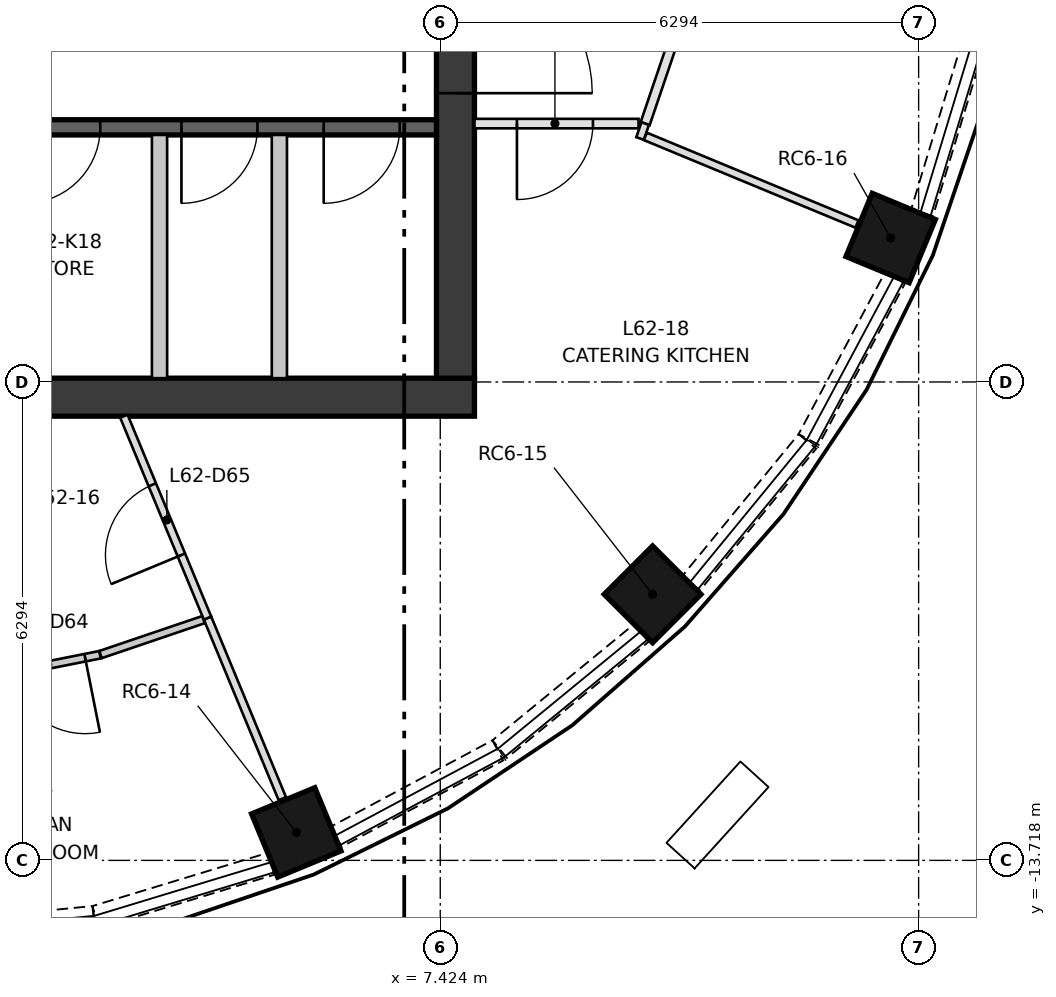
"""IFC4 building model, lengths in metres.
Left out: names, types, materials, properties, quantities, classifications, styles, units other than length and angle.
Written with IfcOpenShell. Run it as: python <this file> out.ifc"""

import sys

from ifc_helpers import new_model, si_unit, direction, frame, frame_2d, origin, origin_2d, place, context, subcontext, project, spatial, rectangle, extrude, element, fill, save


model = new_model("IFC4")
c1 = context("Model", 3, precision=1e-05, world=origin(), true_north=direction((0.0, 1.0)))
c2 = subcontext(c1, "Body", "Model", "MODEL_VIEW")
j1 = project(units=[si_unit("LENGTHUNIT", "METRE"), si_unit("PLANEANGLEUNIT", "RADIAN")], contexts=[c1])
p1 = place(None, origin())
s1 = spatial("IfcSite", under=j1, at=p1, CompositionType="ELEMENT")
p2 = place(p1, origin())
s2 = spatial("IfcBuilding", under=s1, at=p2, CompositionType="ELEMENT")
p3 = place(p2, frame((0.0, 0.0, 227.85)))
s3 = spatial("IfcBuildingStorey", under=s2, at=p3, CompositionType="ELEMENT", Elevation=227.85)
for number, where, z_axis, x_axis in (
    (1, (5.53, -13.35, 0.5), (0.0, 0.0, 1.0), (0.383, -0.924, 0.0)),
    (2, (10.218, -10.218, 0.5), (0.0, 0.0, 1.0), (0.707, -0.707, 0.0)),
    (3, (13.35, -5.53, 0.5), (0.0, 0.0, 1.0), (0.924, -0.383, 0.0)),
):
    element("IfcColumn", number, at=place(p3, frame(where, z_axis=z_axis, x_axis=x_axis)), inside=s3, PredefinedType="COLUMN", context=c2, shape_type="SweptSolid", body=[
        extrude(rectangle(XDim=0.9, YDim=0.9, at=origin_2d()), origin(), (0.0, 0.0, 1.0), 2.35),
    ])
p4 = place(p3, frame((-7.874, -7.624, 0.0), z_axis=(0.0, 0.0, 1.0), x_axis=(1.0, 0.0, 0.0)))
e4 = element("IfcWall", 4, at=p4, inside=s3, PredefinedType="SHEAR", context=c2, shape_type="SweptSolid", body=[
    extrude(rectangle(XDim=15.748, YDim=0.5, at=frame_2d((7.874, 0.0))), origin(), (0.0, 0.0, 1.0), 3.35),
])
p5 = place(p3, frame((7.624, -7.374, 0.0), z_axis=(0.0, 0.0, 1.0), x_axis=(0.0, 1.0, 0.0)))
e5 = element("IfcWall", 5, at=p5, inside=s3, PredefinedType="SHEAR", context=c2, shape_type="SweptSolid", body=[
    extrude(rectangle(XDim=14.748, YDim=0.5, at=frame_2d((7.374, 0.0))), origin(), (0.0, 0.0, 1.0), 3.35),
])
p6 = place(p5, frame((6.874, 0.0, 0.0)))
e6 = element("IfcOpeningElement", 6, at=p6, cuts=e5, PredefinedType="OPENING", context=c2, shape_type="SweptSolid", body=[
    extrude(rectangle(XDim=1.0, YDim=2.1, at=frame_2d((0.5, 1.05))), frame((0.0, 0.26, 0.0), z_axis=(0.0, -1.0, 0.0), x_axis=(1.0, 0.0, 0.0)), (0.0, 0.0, 1.0), 0.52),
])
p7 = place(p5, frame((3.75, 0.0, 0.0)))
e7 = element("IfcOpeningElement", 7, at=p7, cuts=e5, PredefinedType="OPENING", context=c2, shape_type="SweptSolid", body=[
    extrude(rectangle(XDim=1.8, YDim=2.1, at=frame_2d((0.9, 1.05))), frame((0.0, 0.26, 0.0), z_axis=(0.0, -1.0, 0.0), x_axis=(1.0, 0.0, 0.0)), (0.0, 0.0, 1.0), 0.52),
])
p8 = place(p5, frame((9.198, 0.0, 0.0)))
e8 = element("IfcOpeningElement", 8, at=p8, cuts=e5, PredefinedType="OPENING", context=c2, shape_type="SweptSolid", body=[
    extrude(rectangle(XDim=1.8, YDim=2.1, at=frame_2d((0.9, 1.05))), frame((0.0, 0.26, 0.0), z_axis=(0.0, -1.0, 0.0), x_axis=(1.0, 0.0, 0.0)), (0.0, 0.0, 1.0), 0.52),
])
p9 = place(p3, frame((-7.374, -4.074, 0.0), z_axis=(0.0, 0.0, 1.0), x_axis=(1.0, 0.0, 0.0)))
e9 = element("IfcWall", 9, at=p9, inside=s3, PredefinedType="SHEAR", context=c2, shape_type="SweptSolid", body=[
    extrude(rectangle(XDim=14.748, YDim=0.2, at=frame_2d((7.374, 0.0))), origin(), (0.0, 0.0, 1.0), 3.0),
])
p10 = place(p9, frame((1.319, 0.0, 0.0)))
e10 = element("IfcOpeningElement", 10, at=p10, cuts=e9, PredefinedType="OPENING", context=c2, shape_type="SweptSolid", body=[
    extrude(rectangle(XDim=1.1, YDim=2.1, at=frame_2d((0.55, 1.05))), frame((0.0, 0.11, 0.0), z_axis=(0.0, -1.0, 0.0), x_axis=(1.0, 0.0, 0.0)), (0.0, 0.0, 1.0), 0.22),
])
p11 = place(p9, frame((4.456, 0.0, 0.0)))
e11 = element("IfcOpeningElement", 11, at=p11, cuts=e9, PredefinedType="OPENING", context=c2, shape_type="SweptSolid", body=[
    extrude(rectangle(XDim=1.1, YDim=2.1, at=frame_2d((0.55, 1.05))), frame((0.0, 0.11, 0.0), z_axis=(0.0, -1.0, 0.0), x_axis=(1.0, 0.0, 0.0)), (0.0, 0.0, 1.0), 0.22),
])
p12 = place(p9, frame((7.159, 0.0, 0.0)))
e12 = element("IfcOpeningElement", 12, at=p12, cuts=e9, PredefinedType="OPENING", context=c2, shape_type="SweptSolid", body=[
    extrude(rectangle(XDim=0.8, YDim=2.1, at=frame_2d((0.4, 1.05))), frame((0.0, 0.11, 0.0), z_axis=(0.0, -1.0, 0.0), x_axis=(1.0, 0.0, 0.0)), (0.0, 0.0, 1.0), 0.22),
])
p13 = place(p9, frame((9.324, 0.0, 0.0)))
e13 = element("IfcOpeningElement", 13, at=p13, cuts=e9, PredefinedType="OPENING", context=c2, shape_type="SweptSolid", body=[
    extrude(rectangle(XDim=1.0, YDim=2.1, at=frame_2d((0.5, 1.05))), frame((0.0, 0.11, 0.0), z_axis=(0.0, -1.0, 0.0), x_axis=(1.0, 0.0, 0.0)), (0.0, 0.0, 1.0), 0.22),
])
p14 = place(p9, frame((11.393, 0.0, 0.0)))
e14 = element("IfcOpeningElement", 14, at=p14, cuts=e9, PredefinedType="OPENING", context=c2, shape_type="SweptSolid", body=[
    extrude(rectangle(XDim=1.0, YDim=2.1, at=frame_2d((0.5, 1.05))), frame((0.0, 0.11, 0.0), z_axis=(0.0, -1.0, 0.0), x_axis=(1.0, 0.0, 0.0)), (0.0, 0.0, 1.0), 0.22),
])
p15 = place(p9, frame((13.265, 0.0, 0.0)))
e15 = element("IfcOpeningElement", 15, at=p15, cuts=e9, PredefinedType="OPENING", context=c2, shape_type="SweptSolid", body=[
    extrude(rectangle(XDim=1.0, YDim=2.1, at=frame_2d((0.5, 1.05))), frame((0.0, 0.11, 0.0), z_axis=(0.0, -1.0, 0.0), x_axis=(1.0, 0.0, 0.0)), (0.0, 0.0, 1.0), 0.22),
])
for number, where, z_axis, x_axis in (
    (16, (3.73, -7.374, 0.0), (0.0, 0.0, 1.0), (0.0, 1.0, 0.0)),
    (17, (5.307, -7.374, 0.0), (0.0, 0.0, 1.0), (0.0, 1.0, 0.0)),
):
    element("IfcWall", number, at=place(p3, frame(where, z_axis=z_axis, x_axis=x_axis)), inside=s3, PredefinedType="PARTITIONING", context=c2, shape_type="SweptSolid", body=[
        extrude(rectangle(XDim=3.2, YDim=0.2, at=frame_2d((1.6, 0.0))), origin(), (0.0, 0.0, 1.0), 3.0),
    ])
p16 = place(p3, frame((0.463, -14.705, 0.0), z_axis=(0.0, 0.0, 1.0), x_axis=(0.99519336672, 0.09792937678, 0.0)))
e18 = element("IfcWall", 18, at=p16, inside=s3, PredefinedType="SOLIDWALL", context=c2, shape_type="SweptSolid", body=[
    extrude(rectangle(XDim=2.411, YDim=0.3, at=frame_2d((1.205, 0.0))), origin(), (0.0, 0.0, 1.0), 0.9),
])
p17 = place(p3, frame((2.891, -14.463, 0.0), z_axis=(0.0, 0.0, 1.0), x_axis=(0.956901683383, 0.290412066449, 0.0)))
e19 = element("IfcWall", 19, at=p17, inside=s3, PredefinedType="SOLIDWALL", context=c2, shape_type="SweptSolid", body=[
    extrude(rectangle(XDim=2.411, YDim=0.3, at=frame_2d((1.206, 0.0))), origin(), (0.0, 0.0, 1.0), 0.9),
])
p18 = place(p3, frame((6.055, -13.407, 0.0), z_axis=(0.0, 0.0, 1.0), x_axis=(0.881962886229, 0.471318859495, 0.0)))
e20 = element("IfcWall", 20, at=p18, inside=s3, PredefinedType="SOLIDWALL", context=c2, shape_type="SweptSolid", body=[
    extrude(rectangle(XDim=2.41, YDim=0.3, at=frame_2d((1.205, 0.0))), origin(), (0.0, 0.0, 1.0), 0.9),
])
for number, where, z_axis, x_axis in (
    (21, (8.206, -12.254, 0.0), (0.0, 0.0, 1.0), (0.773, 0.634, 0.0)),
    (22, (10.726, -10.07, 0.0), (0.0, 0.0, 1.0), (0.634, 0.773, 0.0)),
):
    element("IfcWall", number, at=place(p3, frame(where, z_axis=z_axis, x_axis=x_axis)), inside=s3, PredefinedType="SOLIDWALL", context=c2, shape_type="SweptSolid", body=[
        extrude(rectangle(XDim=2.411, YDim=0.3, at=frame_2d((1.206, 0.0))), origin(), (0.0, 0.0, 1.0), 0.9),
    ])
p19 = place(p3, frame((12.271, -8.181, 0.0), z_axis=(0.0, 0.0, 1.0), x_axis=(0.471318859495, 0.881962886229, 0.0)))
e23 = element("IfcWall", 23, at=p19, inside=s3, PredefinedType="SOLIDWALL", context=c2, shape_type="SweptSolid", body=[
    extrude(rectangle(XDim=2.41, YDim=0.3, at=frame_2d((1.205, 0.0))), origin(), (0.0, 0.0, 1.0), 0.9),
])
p20 = place(p3, frame((13.762, -5.198, 0.0), z_axis=(0.0, 0.0, 1.0), x_axis=(0.290412066449, 0.956901683383, 0.0)))
e24 = element("IfcWall", 24, at=p20, inside=s3, PredefinedType="SOLIDWALL", context=c2, shape_type="SweptSolid", body=[
    extrude(rectangle(XDim=2.411, YDim=0.3, at=frame_2d((1.206, 0.0))), origin(), (0.0, 0.0, 1.0), 0.9),
])
p21 = place(p3, frame((10.527, -2.825, 0.0), z_axis=(0.0, 0.0, 1.0), x_axis=(-0.321484610675, -0.946914803506, 0.0)))
e25 = element("IfcWall", 25, at=p21, inside=s3, PredefinedType="PARTITIONING", context=c2, shape_type="SweptSolid", body=[
    extrude(rectangle(XDim=1.267, YDim=0.125, at=frame_2d((0.633, 0.0))), origin(), (0.0, 0.0, 1.0), 3.0),
])
p22 = place(p3, frame((10.033, -4.024, 0.0), z_axis=(0.0, 0.0, 1.0), x_axis=(-1.0, 0.0, 0.0)))
e26 = element("IfcWall", 26, at=p22, inside=s3, PredefinedType="PARTITIONING", context=c2, shape_type="SweptSolid", body=[
    extrude(rectangle(XDim=2.159, YDim=0.125, at=frame_2d((1.08, 0.0))), origin(), (0.0, 0.0, 1.0), 3.0),
])
p23 = place(p22, frame((0.6, 0.0, 0.0)))
e27 = element("IfcOpeningElement", 27, at=p23, cuts=e26, PredefinedType="OPENING", context=c2, shape_type="SweptSolid", body=[
    extrude(rectangle(XDim=1.0, YDim=2.1, at=frame_2d((0.5, 1.05))), frame((0.0, 0.073, 0.0), z_axis=(0.0, -1.0, 0.0), x_axis=(1.0, 0.0, 0.0)), (0.0, 0.0, 1.0), 0.145),
])
p24 = place(p3, frame((10.053, -4.221, 0.0), z_axis=(0.0, 0.0, 1.0), x_axis=(0.321164468818, 0.947023433696, 0.0)))
e28 = element("IfcWall", 28, at=p24, inside=s3, PredefinedType="PARTITIONING", context=c2, shape_type="SweptSolid", body=[
    extrude(rectangle(XDim=0.208, YDim=0.105, at=frame_2d((0.104, 0.0))), origin(), (0.0, 0.0, 1.0), 3.0),
])
p25 = place(p3, frame((12.906, -5.346, 0.0), z_axis=(0.0, 0.0, 1.0), x_axis=(-0.923853917674, 0.3827452662, 0.0)))
e29 = element("IfcWall", 29, at=p25, inside=s3, PredefinedType="PARTITIONING", context=c2, shape_type="SweptSolid", body=[
    extrude(rectangle(XDim=3.014, YDim=0.105, at=frame_2d((1.507, 0.0))), origin(), (0.0, 0.0, 1.0), 3.0),
])
p26 = place(p3, frame((2.947, -11.012, 0.0), z_axis=(0.0, 0.0, 1.0), x_axis=(-0.9807636688, -0.195198939448, 0.0)))
e30 = element("IfcWall", 30, at=p26, inside=s3, PredefinedType="PARTITIONING", context=c2, shape_type="SweptSolid", body=[
    extrude(rectangle(XDim=1.485, YDim=0.1, at=frame_2d((0.742, 0.0))), origin(), (0.0, 0.0, 1.0), 3.0),
])
p27 = place(p26, frame((0.2, 0.0, 0.0)))
e31 = element("IfcOpeningElement", 31, at=p27, cuts=e30, PredefinedType="OPENING", context=c2, shape_type="SweptSolid", body=[
    extrude(rectangle(XDim=1.0, YDim=2.1, at=frame_2d((0.5, 1.05))), frame((0.0, 0.06, 0.0), z_axis=(0.0, -1.0, 0.0), x_axis=(1.0, 0.0, 0.0)), (0.0, 0.0, 1.0), 0.12),
])
p28 = place(p3, frame((4.31, -10.55, 0.0), z_axis=(0.0, 0.0, 1.0), x_axis=(-0.946964806335, -0.321337292519, 0.0)))
e32 = element("IfcWall", 32, at=p28, inside=s3, PredefinedType="PARTITIONING", context=c2, shape_type="SweptSolid", body=[
    extrude(rectangle(XDim=1.432, YDim=0.1, at=frame_2d((0.716, 0.0))), origin(), (0.0, 0.0, 1.0), 3.0),
])
p29 = place(p3, frame((4.363, -10.532, 0.0), z_axis=(0.0, 0.0, 1.0), x_axis=(-0.382686527355, 0.923878250519, 0.0)))
e33 = element("IfcWall", 33, at=p29, inside=s3, PredefinedType="PARTITIONING", context=c2, shape_type="SweptSolid", body=[
    extrude(rectangle(XDim=2.877, YDim=0.105, at=frame_2d((1.438, 0.0))), origin(), (0.0, 0.0, 1.0), 3.0),
])
p30 = place(p29, frame((0.9, 0.0, 0.0)))
e34 = element("IfcOpeningElement", 34, at=p30, cuts=e33, PredefinedType="OPENING", context=c2, shape_type="SweptSolid", body=[
    extrude(rectangle(XDim=1.0, YDim=2.1, at=frame_2d((0.5, 1.05))), frame((0.0, 0.062, 0.0), z_axis=(0.0, -1.0, 0.0), x_axis=(1.0, 0.0, 0.0)), (0.0, 0.0, 1.0), 0.125),
])
p31 = place(p3, frame((4.363, -10.532, 0.0), z_axis=(0.0, 0.0, 1.0), x_axis=(0.382746119312, -0.923853564236, 0.0)))
e35 = element("IfcWall", 35, at=p31, inside=s3, PredefinedType="PARTITIONING", context=c2, shape_type="SweptSolid", body=[
    extrude(rectangle(XDim=2.57, YDim=0.105, at=frame_2d((1.285, 0.0))), origin(), (0.0, 0.0, 1.0), 3.0),
])
p32 = place(p13, frame((1.0, 0.0, 0.0), z_axis=(0.0, 0.0, 1.0), x_axis=(-1.0, 0.0, 0.0)))
e36 = element("IfcDoor", 36, at=p32, inside=s3, OperationType="SINGLE_SWING_LEFT", PredefinedType="DOOR", context=c2, shape_type="SweptSolid", body=[
    extrude(rectangle(XDim=1.0, YDim=2.1, at=frame_2d((0.5, 1.05))), frame((0.0, 0.025, 0.0), z_axis=(0.0, -1.0, 0.0), x_axis=(1.0, 0.0, 0.0)), (0.0, 0.0, 1.0), 0.05),
])
fill(e13, e36)
p33 = place(p14, frame((1.0, 0.0, 0.0), z_axis=(0.0, 0.0, 1.0), x_axis=(-1.0, 0.0, 0.0)))
e37 = element("IfcDoor", 37, at=p33, inside=s3, OperationType="SINGLE_SWING_LEFT", PredefinedType="DOOR", context=c2, shape_type="SweptSolid", body=[
    extrude(rectangle(XDim=1.0, YDim=2.1, at=frame_2d((0.5, 1.05))), frame((0.0, 0.025, 0.0), z_axis=(0.0, -1.0, 0.0), x_axis=(1.0, 0.0, 0.0)), (0.0, 0.0, 1.0), 0.05),
])
fill(e14, e37)
p34 = place(p15, frame((1.0, 0.0, 0.0), z_axis=(0.0, 0.0, 1.0), x_axis=(-1.0, 0.0, 0.0)))
e38 = element("IfcDoor", 38, at=p34, inside=s3, OperationType="SINGLE_SWING_LEFT", PredefinedType="DOOR", context=c2, shape_type="SweptSolid", body=[
    extrude(rectangle(XDim=1.0, YDim=2.1, at=frame_2d((0.5, 1.05))), frame((0.0, 0.025, 0.0), z_axis=(0.0, -1.0, 0.0), x_axis=(1.0, 0.0, 0.0)), (0.0, 0.0, 1.0), 0.05),
])
fill(e15, e38)
p35 = place(p7, frame((1.8, 0.0, 0.0), z_axis=(0.0, 0.0, 1.0), x_axis=(-1.0, 0.0, 0.0)))
e39 = element("IfcDoor", 39, at=p35, inside=s3, OperationType="DOUBLE_DOOR_SINGLE_SWING", PredefinedType="DOOR", context=c2, shape_type="SweptSolid", body=[
    extrude(rectangle(XDim=1.8, YDim=2.1, at=frame_2d((0.9, 1.05))), frame((0.0, 0.025, 0.0), z_axis=(0.0, -1.0, 0.0), x_axis=(1.0, 0.0, 0.0)), (0.0, 0.0, 1.0), 0.05),
])
fill(e7, e39)
p36 = place(p23, origin())
e40 = element("IfcDoor", 40, at=p36, inside=s3, OperationType="SINGLE_SWING_RIGHT", PredefinedType="DOOR", context=c2, shape_type="SweptSolid", body=[
    extrude(rectangle(XDim=1.0, YDim=2.1, at=frame_2d((0.5, 1.05))), frame((0.0, 0.025, 0.0), z_axis=(0.0, -1.0, 0.0), x_axis=(1.0, 0.0, 0.0)), (0.0, 0.0, 1.0), 0.05),
])
fill(e27, e40)
p37 = place(p27, origin())
e41 = element("IfcDoor", 41, at=p37, inside=s3, OperationType="SINGLE_SWING_LEFT", PredefinedType="DOOR", context=c2, shape_type="SweptSolid", body=[
    extrude(rectangle(XDim=1.0, YDim=2.1, at=frame_2d((0.5, 1.05))), frame((0.0, 0.025, 0.0), z_axis=(0.0, -1.0, 0.0), x_axis=(1.0, 0.0, 0.0)), (0.0, 0.0, 1.0), 0.05),
])
fill(e31, e41)
p38 = place(p30, origin())
e42 = element("IfcDoor", 42, at=p38, inside=s3, OperationType="SINGLE_SWING_LEFT", PredefinedType="DOOR", context=c2, shape_type="SweptSolid", body=[
    extrude(rectangle(XDim=1.0, YDim=2.1, at=frame_2d((0.5, 1.05))), frame((0.0, 0.025, 0.0), z_axis=(0.0, -1.0, 0.0), x_axis=(1.0, 0.0, 0.0)), (0.0, 0.0, 1.0), 0.05),
])
fill(e34, e42)
save(model, sys.argv[1])
